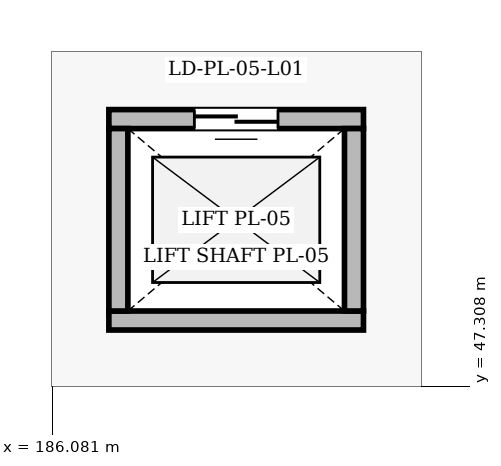
"""IFC4 building model, lengths in metres.
Left out: names, types, materials, properties, quantities, classifications, styles, units other than length and angle.
Written with IfcOpenShell. Run it as: python <this file> out.ifc"""

import sys

from ifc_helpers import new_model, si_unit, direction, frame, frame_2d, origin, place, context, subcontext, project, spatial, rectangle, extrude, element, fill, save


model = new_model("IFC4")
c1 = context("Model", 3, precision=1e-05, world=origin(), true_north=direction((0.0, 1.0)))
c2 = subcontext(c1, "Body", "Model", "MODEL_VIEW")
j1 = project(units=[si_unit("LENGTHUNIT", "METRE"), si_unit("PLANEANGLEUNIT", "RADIAN")], contexts=[c1])
p1 = place(None, origin())
s1 = spatial("IfcSite", under=j1, at=p1, CompositionType="ELEMENT")
p2 = place(p1, origin())
s2 = spatial("IfcBuilding", under=s1, at=p2, CompositionType="ELEMENT")
p3 = place(p2, frame((0.0, 0.0, 5.4)))
s3 = spatial("IfcBuildingStorey", under=s2, at=p3, CompositionType="ELEMENT", Elevation=5.4)
p4 = place(p3, frame((186.825, 48.175, 0.0), z_axis=(0.0, 0.0, 1.0), x_axis=(1.0, 0.0, 0.0)))
e1 = element("IfcWall", 1, at=p4, inside=s3, PredefinedType="SOLIDWALL", context=c2, shape_type="SweptSolid", body=[
    extrude(rectangle(XDim=3.35, YDim=0.25, at=frame_2d((1.675, 0.0))), origin(), (0.0, 0.0, 1.0), 4.668),
])
p5 = place(p3, frame((190.175, 50.825, 0.0), z_axis=(0.0, 0.0, 1.0), x_axis=(-1.0, 0.0, 0.0)))
e2 = element("IfcWall", 2, at=p5, inside=s3, PredefinedType="SOLIDWALL", context=c2, shape_type="SweptSolid", body=[
    extrude(rectangle(XDim=3.35, YDim=0.25, at=frame_2d((1.675, 0.0))), origin(), (0.0, 0.0, 1.0), 4.668),
])
p6 = place(p5, frame((1.125, 0.0, 0.0)))
e3 = element("IfcOpeningElement", 3, at=p6, cuts=e2, PredefinedType="OPENING", context=c2, shape_type="SweptSolid", body=[
    extrude(rectangle(XDim=1.1, YDim=2.2, at=frame_2d((0.55, 1.1))), frame((0.0, 0.135, 0.0), z_axis=(0.0, -1.0, 0.0), x_axis=(1.0, 0.0, 0.0)), (0.0, 0.0, 1.0), 0.27),
])
for number, where, z_axis, x_axis in (
    (4, (186.95, 50.7, 0.0), (0.0, 0.0, 1.0), (0.0, -1.0, 0.0)),
    (5, (190.05, 48.3, 0.0), (0.0, 0.0, 1.0), (0.0, 1.0, 0.0)),
):
    element("IfcWall", number, at=place(p3, frame(where, z_axis=z_axis, x_axis=x_axis)), inside=s3, PredefinedType="SOLIDWALL", context=c2, shape_type="SweptSolid", body=[
        extrude(rectangle(XDim=2.4, YDim=0.25, at=frame_2d((1.2, 0.0))), origin(), (0.0, 0.0, 1.0), 5.16),
    ])
p7 = place(p6, origin())
e6 = element("IfcDoor", 6, at=p7, inside=s3, OperationType="DOUBLE_DOOR_SLIDING", PredefinedType="DOOR", context=c2, shape_type="SweptSolid", body=[
    extrude(rectangle(XDim=1.1, YDim=2.2, at=frame_2d((0.55, 1.1))), frame((0.0, 0.025, 0.0), z_axis=(0.0, -1.0, 0.0), x_axis=(1.0, 0.0, 0.0)), (0.0, 0.0, 1.0), 0.05),
])
fill(e3, e6)
save(model, sys.argv[1])
